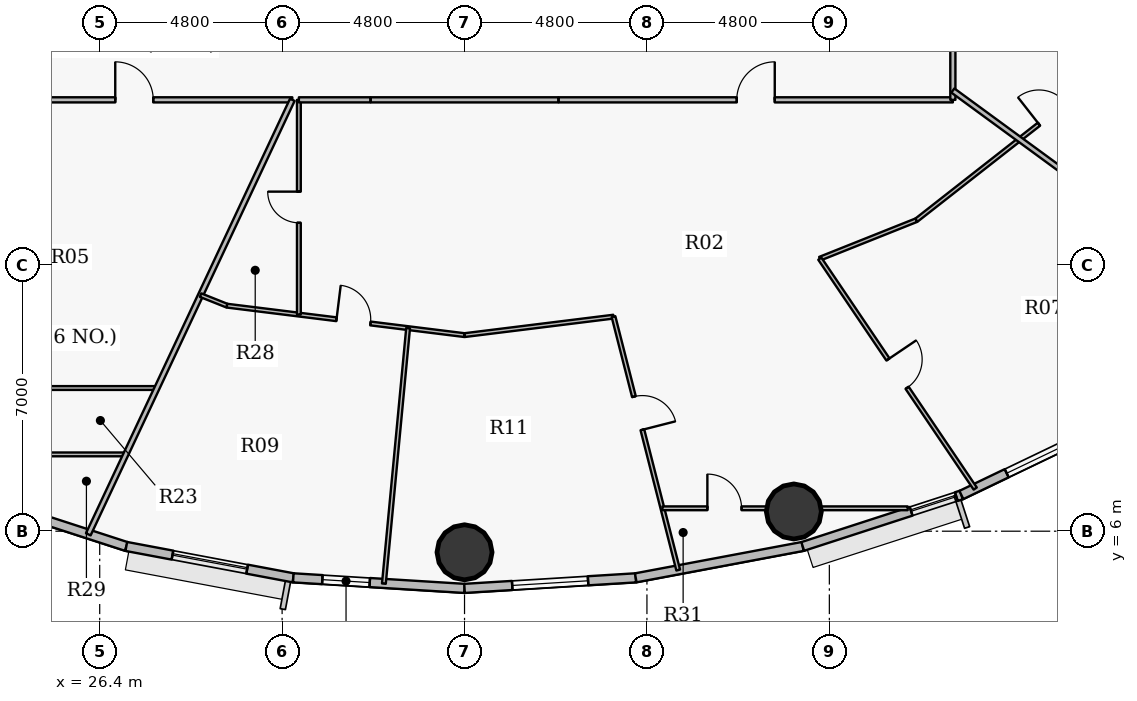
"""IFC4 building model, lengths in metres.
Left out: names, types, materials, properties, quantities, classifications, styles, units other than length and angle.
Written with IfcOpenShell. Run it as: python <this file> out.ifc"""

import sys

from ifc_helpers import new_model, si_unit, direction, frame, frame_2d, origin, origin_2d, place, context, subcontext, project, spatial, rectangle, hollow_circle, extrude, source, transform, mapped, element, fill, save


model = new_model("IFC4")
c1 = context("Model", 3, precision=1e-05, world=origin(), true_north=direction((0.0, 1.0)))
c2 = subcontext(c1, "Body", "Model", "MODEL_VIEW")
j1 = project(units=[si_unit("LENGTHUNIT", "METRE"), si_unit("PLANEANGLEUNIT", "RADIAN")], contexts=[c1])
p1 = place(None, origin())
s1 = spatial("IfcSite", under=j1, at=p1, CompositionType="ELEMENT")
p2 = place(p1, origin())
s2 = spatial("IfcBuilding", under=s1, at=p2, CompositionType="ELEMENT")
p3 = place(p2, frame((0.0, 0.0, 142.2)))
s3 = spatial("IfcBuildingStorey", under=s2, at=p3, CompositionType="ELEMENT", Elevation=142.2)
for number, where, z_axis, x_axis in (
    (1, (36.0, 5.445, 0.0), (0.0, 0.0, 1.0), (1.0, 0.0, 0.0)),
    (2, (44.666, 6.519, 0.0), (0.0, 0.0, 1.0), (1.0, 0.0, 0.0)),
):
    element("IfcColumn", number, at=place(p3, frame(where, z_axis=z_axis, x_axis=x_axis)), inside=s3, PredefinedType="COLUMN", context=c2, shape_type="SweptSolid", body=[
        extrude(hollow_circle(Radius=0.725, WallThickness=0.042, at=origin_2d()), origin(), (0.0, 0.0, 1.0), 3.75),
    ])
p4 = place(p3, frame((27.1, 5.599, 0.0), z_axis=(0.0, 0.0, 1.0), x_axis=(-0.951211346073, 0.308540070495, 0.0)))
e3 = element("IfcWall", 3, at=p4, inside=s3, PredefinedType="SOLIDWALL", context=c2, shape_type="SweptSolid", body=[
    extrude(rectangle(XDim=4.388, YDim=0.24, at=frame_2d((2.194, 0.0))), origin(), (0.0, 0.0, 1.0), 3.45),
])
p5 = place(p3, frame((31.494, 4.773, 0.0), z_axis=(0.0, 0.0, 1.0), x_axis=(-0.982789252177, 0.184730305596, 0.0)))
e4 = element("IfcWall", 4, at=p5, inside=s3, PredefinedType="SOLIDWALL", context=c2, shape_type="SweptSolid", body=[
    extrude(rectangle(XDim=4.471, YDim=0.24, at=frame_2d((2.235, 0.0))), origin(), (0.0, 0.0, 1.0), 3.45),
])
p6 = place(p5, frame((1.236, 0.0, 0.9)))
e5 = element("IfcOpeningElement", 5, at=p6, cuts=e4, PredefinedType="OPENING", context=c2, shape_type="SweptSolid", body=[
    extrude(rectangle(XDim=2.0, YDim=1.75, at=origin_2d()), frame((1.0, 0.13, 0.875), z_axis=(0.0, -1.0, 0.0), x_axis=(1.0, 0.0, 0.0)), (0.0, 0.0, 1.0), 0.26),
])
p7 = place(p3, frame((36.0, 4.495, 0.0), z_axis=(0.0, 0.0, 1.0), x_axis=(-0.998107531589, 0.061492726276, 0.0)))
e6 = element("IfcWall", 6, at=p7, inside=s3, PredefinedType="SOLIDWALL", context=c2, shape_type="SweptSolid", body=[
    extrude(rectangle(XDim=4.514, YDim=0.24, at=frame_2d((2.257, 0.0))), origin(), (0.0, 0.0, 1.0), 3.45),
])
p8 = place(p7, frame((2.499, 0.0, 0.9)))
e7 = element("IfcOpeningElement", 7, at=p8, cuts=e6, PredefinedType="OPENING", context=c2, shape_type="SweptSolid", body=[
    extrude(rectangle(XDim=1.25, YDim=1.65, at=origin_2d()), frame((0.625, 0.13, 0.825), z_axis=(0.0, -1.0, 0.0), x_axis=(1.0, 0.0, 0.0)), (0.0, 0.0, 1.0), 0.26),
])
p9 = place(p3, frame((40.506, 4.773, 0.0), z_axis=(0.0, 0.0, 1.0), x_axis=(-0.998107531589, -0.061492726276, 0.0)))
e8 = element("IfcWall", 8, at=p9, inside=s3, PredefinedType="SOLIDWALL", context=c2, shape_type="SweptSolid", body=[
    extrude(rectangle(XDim=4.514, YDim=0.24, at=frame_2d((2.257, 0.0))), origin(), (0.0, 0.0, 1.0), 3.45),
])
p10 = place(p9, frame((1.257, 0.0, 0.9)))
e9 = element("IfcOpeningElement", 9, at=p10, cuts=e8, PredefinedType="OPENING", context=c2, shape_type="SweptSolid", body=[
    extrude(rectangle(XDim=2.0, YDim=1.75, at=origin_2d()), frame((1.0, 0.13, 0.875), z_axis=(0.0, -1.0, 0.0), x_axis=(1.0, 0.0, 0.0)), (0.0, 0.0, 1.0), 0.26),
])
p11 = place(p3, frame((44.9, 5.599, 0.0), z_axis=(0.0, 0.0, 1.0), x_axis=(-0.982789252177, -0.184730305596, 0.0)))
e10 = element("IfcWall", 10, at=p11, inside=s3, PredefinedType="SOLIDWALL", context=c2, shape_type="SweptSolid", body=[
    extrude(rectangle(XDim=4.471, YDim=0.24, at=frame_2d((2.235, 0.0))), origin(), (0.0, 0.0, 1.0), 3.45),
])
p12 = place(p3, frame((49.074, 6.953, 0.0), z_axis=(0.0, 0.0, 1.0), x_axis=(-0.951211346073, -0.308540070495, 0.0)))
e11 = element("IfcWall", 11, at=p12, inside=s3, PredefinedType="SOLIDWALL", context=c2, shape_type="SweptSolid", body=[
    extrude(rectangle(XDim=4.388, YDim=0.24, at=frame_2d((2.194, 0.0))), origin(), (0.0, 0.0, 1.0), 3.45),
])
p13 = place(p12, frame((0.14, 0.0, 0.9)))
e12 = element("IfcOpeningElement", 12, at=p13, cuts=e11, PredefinedType="OPENING", context=c2, shape_type="SweptSolid", body=[
    extrude(rectangle(XDim=1.25, YDim=1.65, at=origin_2d()), frame((0.625, 0.13, 0.825), z_axis=(0.0, -1.0, 0.0), x_axis=(1.0, 0.0, 0.0)), (0.0, 0.0, 1.0), 0.26),
])
p14 = place(p3, frame((52.925, 8.801, 0.0), z_axis=(0.0, 0.0, 1.0), x_axis=(-0.901589935876, -0.432591709962, 0.0)))
e13 = element("IfcWall", 13, at=p14, inside=s3, PredefinedType="SOLIDWALL", context=c2, shape_type="SweptSolid", body=[
    extrude(rectangle(XDim=4.272, YDim=0.24, at=frame_2d((2.136, 0.0))), origin(), (0.0, 0.0, 1.0), 3.45),
])
p15 = place(p14, frame((0.949, 0.0, 0.9)))
e14 = element("IfcOpeningElement", 14, at=p15, cuts=e13, PredefinedType="OPENING", context=c2, shape_type="SweptSolid", body=[
    extrude(rectangle(XDim=2.0, YDim=1.75, at=origin_2d()), frame((1.0, 0.13, 0.875), z_axis=(0.0, -1.0, 0.0), x_axis=(1.0, 0.0, 0.0)), (0.0, 0.0, 1.0), 0.26),
])
p16 = place(p3, frame((17.62, 9.768, 0.0), z_axis=(0.0, 0.0, 1.0), x_axis=(1.0, 0.0, 0.0)))
e15 = element("IfcWall", 15, at=p16, inside=s3, PredefinedType="PARTITIONING", context=c2, shape_type="SweptSolid", body=[
    extrude(rectangle(XDim=10.288, YDim=0.1, at=frame_2d((5.144, 0.0))), origin(), (0.0, 0.0, 1.0), 2.885),
])
p17 = place(p16, frame((3.322, 0.0, 0.0)))
e16 = element("IfcOpeningElement", 16, at=p17, cuts=e15, PredefinedType="OPENING", context=c2, shape_type="SweptSolid", body=[
    extrude(rectangle(XDim=0.9, YDim=2.1, at=origin_2d()), frame((0.45, 0.06, 1.05), z_axis=(0.0, -1.0, 0.0), x_axis=(1.0, 0.0, 0.0)), (0.0, 0.0, 1.0), 0.12),
])
p18 = place(p3, frame((20.688, 8.021, 0.0), z_axis=(0.0, 0.0, 1.0), x_axis=(1.0, 0.0, 0.0)))
e17 = element("IfcWall", 17, at=p18, inside=s3, PredefinedType="PARTITIONING", context=c2, shape_type="SweptSolid", body=[
    extrude(rectangle(XDim=6.399, YDim=0.1, at=frame_2d((3.2, 0.0))), origin(), (0.0, 0.0, 1.0), 2.885),
])
p19 = place(p18, frame((3.591, 0.0, 0.0)))
e18 = element("IfcOpeningElement", 18, at=p19, cuts=e17, PredefinedType="OPENING", context=c2, shape_type="SweptSolid", body=[
    extrude(rectangle(XDim=0.82, YDim=2.1, at=origin_2d()), frame((0.41, 0.06, 1.05), z_axis=(0.0, -1.0, 0.0), x_axis=(1.0, 0.0, 0.0)), (0.0, 0.0, 1.0), 0.12),
])
p20 = place(p3, frame((23.15, 17.35, 0.0), z_axis=(0.0, 0.0, 1.0), x_axis=(1.0, 0.0, 0.0)))
e19 = element("IfcWall", 19, at=p20, inside=s3, PredefinedType="PARTITIONING", context=c2, shape_type="SweptSolid", body=[
    extrude(rectangle(XDim=8.318, YDim=0.135, at=frame_2d((4.159, 0.0))), origin(), (0.0, 0.0, 1.0), 2.885),
])
p21 = place(p20, frame((3.659, 0.0, 0.0)))
e20 = element("IfcOpeningElement", 20, at=p21, cuts=e19, PredefinedType="OPENING", context=c2, shape_type="SweptSolid", body=[
    extrude(rectangle(XDim=1.0, YDim=2.15, at=origin_2d()), frame((0.5, 0.078, 1.075), z_axis=(0.0, -1.0, 0.0), x_axis=(1.0, 0.0, 0.0)), (0.0, 0.0, 1.0), 0.155),
])
p22 = place(p3, frame((26.1, 5.918, 0.0), z_axis=(0.0, 0.0, 1.0), x_axis=(0.425072644526, 0.905159238408, 0.0)))
e21 = element("IfcWall", 21, at=p22, inside=s3, PredefinedType="PARTITIONING", context=c2, shape_type="SweptSolid", body=[
    extrude(rectangle(XDim=12.63, YDim=0.135, at=frame_2d((6.315, 0.0))), origin(), (0.0, 0.0, 1.0), 2.885),
])
p23 = place(p3, frame((29.055, 12.211, 0.0), z_axis=(0.0, 0.0, 1.0), x_axis=(0.928859514795, -0.370432182423, 0.0)))
e22 = element("IfcWall", 22, at=p23, inside=s3, PredefinedType="PARTITIONING", context=c2, shape_type="SweptSolid", body=[
    extrude(rectangle(XDim=0.747, YDim=0.1, at=frame_2d((0.374, 0.0))), origin(), (0.0, 0.0, 1.0), 3.45),
])
p24 = place(p3, frame((29.749, 11.934, 0.0), z_axis=(0.0, 0.0, 1.0), x_axis=(0.992395485088, -0.123090215599, 0.0)))
e23 = element("IfcWall", 23, at=p24, inside=s3, PredefinedType="PARTITIONING", context=c2, shape_type="SweptSolid", body=[
    extrude(rectangle(XDim=6.299, YDim=0.1, at=frame_2d((3.15, 0.0))), origin(), (0.0, 0.0, 1.0), 2.885),
])
p25 = place(p24, frame((2.905, 0.0, 0.0)))
e24 = element("IfcOpeningElement", 24, at=p25, cuts=e23, PredefinedType="OPENING", context=c2, shape_type="SweptSolid", body=[
    extrude(rectangle(XDim=0.9, YDim=2.1, at=origin_2d()), frame((0.45, 0.06, 1.05), z_axis=(0.0, -1.0, 0.0), x_axis=(1.0, 0.0, 0.0)), (0.0, 0.0, 1.0), 0.12),
])
p26 = place(p3, frame((31.641, 11.7, 0.0), z_axis=(0.0, 0.0, 1.0), x_axis=(0.0, 1.0, 0.0)))
e25 = element("IfcWall", 25, at=p26, inside=s3, PredefinedType="PARTITIONING", context=c2, shape_type="SweptSolid", body=[
    extrude(rectangle(XDim=5.65, YDim=0.1, at=frame_2d((2.825, 0.0))), origin(), (0.0, 0.0, 1.0), 3.45),
])
p27 = place(p26, frame((2.415, 0.0, 0.0)))
e26 = element("IfcOpeningElement", 26, at=p27, cuts=e25, PredefinedType="OPENING", context=c2, shape_type="SweptSolid", body=[
    extrude(rectangle(XDim=0.82, YDim=2.1, at=origin_2d()), frame((0.41, 0.06, 1.05), z_axis=(0.0, -1.0, 0.0), x_axis=(1.0, 0.0, 0.0)), (0.0, 0.0, 1.0), 0.12),
])
p28 = place(p3, frame((31.641, 17.35, 0.0), z_axis=(0.0, 0.0, 1.0), x_axis=(1.0, 0.0, 0.0)))
e27 = element("IfcWall", 27, at=p28, inside=s3, PredefinedType="PARTITIONING", context=c2, shape_type="SweptSolid", body=[
    extrude(rectangle(XDim=1.882, YDim=0.135, at=frame_2d((0.941, 0.0))), origin(), (0.0, 0.0, 1.0), 3.45),
])
p29 = place(p3, frame((33.878, 4.621, 0.0), z_axis=(0.0, 0.0, 1.0), x_axis=(0.094368865944, 0.995537300728, 0.0)))
e28 = element("IfcWall", 28, at=p29, inside=s3, PredefinedType="PARTITIONING", context=c2, shape_type="SweptSolid", body=[
    extrude(rectangle(XDim=6.752, YDim=0.1, at=frame_2d((3.376, 0.0))), origin(), (0.0, 0.0, 1.0), 2.885),
])
p30 = place(p3, frame((36.0, 11.159, 0.0), z_axis=(0.0, 0.0, 1.0), x_axis=(0.992393437711, 0.123106721131, 0.0)))
e29 = element("IfcWall", 29, at=p30, inside=s3, PredefinedType="PARTITIONING", context=c2, shape_type="SweptSolid", body=[
    extrude(rectangle(XDim=3.95, YDim=0.1, at=frame_2d((1.975, 0.0))), origin(), (0.0, 0.0, 1.0), 2.885),
])
p31 = place(p3, frame((38.477, 17.35, 0.0), z_axis=(0.0, 0.0, 1.0), x_axis=(1.0, 0.0, 0.0)))
e30 = element("IfcWall", 30, at=p31, inside=s3, PredefinedType="PARTITIONING", context=c2, shape_type="SweptSolid", body=[
    extrude(rectangle(XDim=10.373, YDim=0.135, at=frame_2d((5.187, 0.0))), origin(), (0.0, 0.0, 1.0), 2.885),
])
p32 = place(p31, frame((4.687, 0.0, 0.0)))
e31 = element("IfcOpeningElement", 31, at=p32, cuts=e30, PredefinedType="OPENING", context=c2, shape_type="SweptSolid", body=[
    extrude(rectangle(XDim=1.0, YDim=2.15, at=origin_2d()), frame((0.5, 0.078, 1.075), z_axis=(0.0, -1.0, 0.0), x_axis=(1.0, 0.0, 0.0)), (0.0, 0.0, 1.0), 0.155),
])
p33 = place(p3, frame((39.92, 11.645, 0.0), z_axis=(0.0, 0.0, 1.0), x_axis=(0.24735773306, -0.968924224021, 0.0)))
e32 = element("IfcWall", 32, at=p33, inside=s3, PredefinedType="PARTITIONING", context=c2, shape_type="SweptSolid", body=[
    extrude(rectangle(XDim=6.881, YDim=0.1, at=frame_2d((3.441, 0.0))), origin(), (0.0, 0.0, 1.0), 2.885),
])
p34 = place(p33, frame((2.172, 0.0, 0.0)))
e33 = element("IfcOpeningElement", 33, at=p34, cuts=e32, PredefinedType="OPENING", context=c2, shape_type="SweptSolid", body=[
    extrude(rectangle(XDim=0.9, YDim=2.1, at=origin_2d()), frame((0.45, 0.06, 1.05), z_axis=(0.0, -1.0, 0.0), x_axis=(1.0, 0.0, 0.0)), (0.0, 0.0, 1.0), 0.12),
])
p35 = place(p3, frame((41.208, 6.603, 0.0), z_axis=(0.0, 0.0, 1.0), x_axis=(1.0, 0.0, 0.0)))
e34 = element("IfcWall", 34, at=p35, inside=s3, PredefinedType="PARTITIONING", context=c2, shape_type="SweptSolid", body=[
    extrude(rectangle(XDim=6.453, YDim=0.1, at=frame_2d((3.227, 0.0))), origin(), (0.0, 0.0, 1.0), 2.885),
])
p36 = place(p35, frame((1.183, 0.0, 0.0)))
e35 = element("IfcOpeningElement", 35, at=p36, cuts=e34, PredefinedType="OPENING", context=c2, shape_type="SweptSolid", body=[
    extrude(rectangle(XDim=0.9, YDim=2.1, at=origin_2d()), frame((0.45, 0.06, 1.05), z_axis=(0.0, -1.0, 0.0), x_axis=(1.0, 0.0, 0.0)), (0.0, 0.0, 1.0), 0.12),
])
p37 = place(p3, frame((45.35, 13.17, 0.0), z_axis=(0.0, 0.0, 1.0), x_axis=(0.928802486491, 0.370575149044, 0.0)))
e36 = element("IfcWall", 36, at=p37, inside=s3, PredefinedType="PARTITIONING", context=c2, shape_type="SweptSolid", body=[
    extrude(rectangle(XDim=2.736, YDim=0.1, at=frame_2d((1.368, 0.0))), origin(), (0.0, 0.0, 1.0), 3.45),
])
p38 = place(p3, frame((45.35, 13.17, 0.0), z_axis=(0.0, 0.0, 1.0), x_axis=(0.560082631059, -0.828436748573, 0.0)))
e37 = element("IfcWall", 37, at=p38, inside=s3, PredefinedType="PARTITIONING", context=c2, shape_type="SweptSolid", body=[
    extrude(rectangle(XDim=7.301, YDim=0.1, at=frame_2d((3.65, 0.0))), origin(), (0.0, 0.0, 1.0), 2.885),
])
p39 = place(p38, frame((3.2, 0.0, 0.0)))
e38 = element("IfcOpeningElement", 38, at=p39, cuts=e37, PredefinedType="OPENING", context=c2, shape_type="SweptSolid", body=[
    extrude(rectangle(XDim=0.9, YDim=2.1, at=origin_2d()), frame((0.45, 0.06, 1.05), z_axis=(0.0, -1.0, 0.0), x_axis=(1.0, 0.0, 0.0)), (0.0, 0.0, 1.0), 0.12),
])
p40 = place(p3, frame((47.891, 14.184, 0.0), z_axis=(0.0, 0.0, 1.0), x_axis=(0.787333679705, 0.616527109544, 0.0)))
e39 = element("IfcWall", 39, at=p40, inside=s3, PredefinedType="PARTITIONING", context=c2, shape_type="SweptSolid", body=[
    extrude(rectangle(XDim=5.685, YDim=0.1, at=frame_2d((2.842, 0.0))), origin(), (0.0, 0.0, 1.0), 2.885),
])
p41 = place(p40, frame((4.096, 0.0, 0.0)))
e40 = element("IfcOpeningElement", 40, at=p41, cuts=e39, PredefinedType="OPENING", context=c2, shape_type="SweptSolid", body=[
    extrude(rectangle(XDim=0.9, YDim=2.1, at=origin_2d()), frame((0.45, 0.06, 1.05), z_axis=(0.0, -1.0, 0.0), x_axis=(1.0, 0.0, 0.0)), (0.0, 0.0, 1.0), 0.12),
])
p42 = place(p3, frame((48.85, 17.35, 0.0), z_axis=(0.0, 0.0, 1.0), x_axis=(0.0, 1.0, 0.0)))
e41 = element("IfcWall", 41, at=p42, inside=s3, PredefinedType="PARTITIONING", context=c2, shape_type="SweptSolid", body=[
    extrude(rectangle(XDim=19.3, YDim=0.135, at=frame_2d((9.65, 0.0))), origin(), (0.0, 0.0, 1.0), 2.885),
])
p43 = place(p42, frame((7.609, 0.0, 0.0)))
e42 = element("IfcOpeningElement", 42, at=p43, cuts=e41, PredefinedType="OPENING", context=c2, shape_type="SweptSolid", body=[
    extrude(rectangle(XDim=1.0, YDim=2.15, at=origin_2d()), frame((0.5, 0.078, 1.075), z_axis=(0.0, -1.0, 0.0), x_axis=(1.0, 0.0, 0.0)), (0.0, 0.0, 1.0), 0.155),
])
p44 = place(p3, frame((48.85, 17.595, 0.0), z_axis=(0.0, 0.0, 1.0), x_axis=(0.806958414, -0.590608261096, 0.0)))
e43 = element("IfcWall", 43, at=p44, inside=s3, PredefinedType="PARTITIONING", context=c2, shape_type="SweptSolid", body=[
    extrude(rectangle(XDim=10.063, YDim=0.135, at=frame_2d((5.032, 0.0))), origin(), (0.0, 0.0, 1.0), 2.885),
])
p45 = place(p3, frame((38.467, 17.35, 0.0), z_axis=(0.0, 0.0, 1.0), x_axis=(-1.0, 0.0, 0.0)))
e44 = element("IfcWall", 44, at=p45, inside=s3, PredefinedType="PARTITIONING", context=c2, shape_type="SweptSolid", body=[
    extrude(rectangle(XDim=4.934, YDim=0.135, at=frame_2d((2.467, 0.0))), origin(), (0.0, 0.0, 1.0), 2.885),
])
m1 = source(origin(), c2, "Body", "SweptSolid", [
    extrude(rectangle(XDim=2.0, YDim=1.75, at=origin_2d()), frame((1.0, 0.03, 0.875), z_axis=(0.0, -1.0, 0.0), x_axis=(1.0, 0.0, 0.0)), (0.0, 0.0, 1.0), 0.06),
])
p46 = place(p6, origin())
e45 = element("IfcWindow", 45, at=p46, inside=s3, PartitioningType="DOUBLE_PANEL_VERTICAL", PredefinedType="WINDOW", context=c2, shape_type="MappedRepresentation", body=[
    mapped(m1, transform((0.0, 0.0, 0.0), x_axis=(1.0, 0.0, 0.0), y_axis=(0.0, 1.0, 0.0), z_axis=(0.0, 0.0, 1.0), scale=1.0)),
])
fill(e5, e45)
m2 = source(origin(), c2, "Body", "SweptSolid", [
    extrude(rectangle(XDim=1.25, YDim=1.65, at=origin_2d()), frame((0.625, 0.03, 0.825), z_axis=(0.0, -1.0, 0.0), x_axis=(1.0, 0.0, 0.0)), (0.0, 0.0, 1.0), 0.06),
])
p47 = place(p8, origin())
e46 = element("IfcWindow", 46, at=p47, inside=s3, PartitioningType="SINGLE_PANEL", PredefinedType="WINDOW", context=c2, shape_type="MappedRepresentation", body=[
    mapped(m2, transform((0.0, 0.0, 0.0), x_axis=(1.0, 0.0, 0.0), y_axis=(0.0, 1.0, 0.0), z_axis=(0.0, 0.0, 1.0), scale=1.0)),
])
fill(e7, e46)
p48 = place(p10, origin())
e47 = element("IfcWindow", 47, at=p48, inside=s3, PartitioningType="DOUBLE_PANEL_VERTICAL", PredefinedType="WINDOW", context=c2, shape_type="MappedRepresentation", body=[
    mapped(m1, transform((0.0, 0.0, 0.0), x_axis=(1.0, 0.0, 0.0), y_axis=(0.0, 1.0, 0.0), z_axis=(0.0, 0.0, 1.0), scale=1.0)),
])
fill(e9, e47)
p49 = place(p15, origin())
e48 = element("IfcWindow", 48, at=p49, inside=s3, PartitioningType="DOUBLE_PANEL_VERTICAL", PredefinedType="WINDOW", context=c2, shape_type="MappedRepresentation", body=[
    mapped(m1, transform((0.0, 0.0, 0.0), x_axis=(1.0, 0.0, 0.0), y_axis=(0.0, 1.0, 0.0), z_axis=(0.0, 0.0, 1.0), scale=1.0)),
])
fill(e14, e48)
p50 = place(p13, origin())
e49 = element("IfcWindow", 49, at=p50, inside=s3, PartitioningType="SINGLE_PANEL", PredefinedType="WINDOW", context=c2, shape_type="MappedRepresentation", body=[
    mapped(m2, transform((0.0, 0.0, 0.0), x_axis=(1.0, 0.0, 0.0), y_axis=(0.0, 1.0, 0.0), z_axis=(0.0, 0.0, 1.0), scale=1.0)),
])
fill(e12, e49)
m3 = source(origin(), c2, "Body", "SweptSolid", [
    extrude(rectangle(XDim=1.0, YDim=2.15, at=origin_2d()), frame((0.5, 0.025, 1.075), z_axis=(0.0, -1.0, 0.0), x_axis=(1.0, 0.0, 0.0)), (0.0, 0.0, 1.0), 0.05),
])
p51 = place(p21, origin())
e50 = element("IfcDoor", 50, at=p51, inside=s3, OperationType="SINGLE_SWING_LEFT", PredefinedType="DOOR", context=c2, shape_type="MappedRepresentation", body=[
    mapped(m3, transform((0.0, 0.0, 0.0), x_axis=(1.0, 0.0, 0.0), y_axis=(0.0, 1.0, 0.0), z_axis=(0.0, 0.0, 1.0), scale=1.0)),
])
fill(e20, e50)
p52 = place(p32, origin())
e51 = element("IfcDoor", 51, at=p52, inside=s3, OperationType="SINGLE_SWING_RIGHT", PredefinedType="DOOR", context=c2, shape_type="MappedRepresentation", body=[
    mapped(m3, transform((0.0, 0.0, 0.0), x_axis=(1.0, 0.0, 0.0), y_axis=(0.0, 1.0, 0.0), z_axis=(0.0, 0.0, 1.0), scale=1.0)),
])
fill(e31, e51)
m4 = source(origin(), c2, "Body", "SweptSolid", [
    extrude(rectangle(XDim=0.9, YDim=2.1, at=origin_2d()), frame((0.45, 0.025, 1.05), z_axis=(0.0, -1.0, 0.0), x_axis=(1.0, 0.0, 0.0)), (0.0, 0.0, 1.0), 0.05),
])
p53 = place(p25, origin())
e52 = element("IfcDoor", 52, at=p53, inside=s3, OperationType="SINGLE_SWING_LEFT", PredefinedType="DOOR", context=c2, shape_type="MappedRepresentation", body=[
    mapped(m4, transform((0.0, 0.0, 0.0), x_axis=(1.0, 0.0, 0.0), y_axis=(0.0, 1.0, 0.0), z_axis=(0.0, 0.0, 1.0), scale=1.0)),
])
fill(e24, e52)
p54 = place(p34, origin())
e53 = element("IfcDoor", 53, at=p54, inside=s3, OperationType="SINGLE_SWING_RIGHT", PredefinedType="DOOR", context=c2, shape_type="MappedRepresentation", body=[
    mapped(m4, transform((0.0, 0.0, 0.0), x_axis=(1.0, 0.0, 0.0), y_axis=(0.0, 1.0, 0.0), z_axis=(0.0, 0.0, 1.0), scale=1.0)),
])
fill(e33, e53)
p55 = place(p39, origin())
e54 = element("IfcDoor", 54, at=p55, inside=s3, OperationType="SINGLE_SWING_LEFT", PredefinedType="DOOR", context=c2, shape_type="MappedRepresentation", body=[
    mapped(m4, transform((0.0, 0.0, 0.0), x_axis=(1.0, 0.0, 0.0), y_axis=(0.0, 1.0, 0.0), z_axis=(0.0, 0.0, 1.0), scale=1.0)),
])
fill(e38, e54)
m5 = source(origin(), c2, "Body", "SweptSolid", [
    extrude(rectangle(XDim=0.82, YDim=2.1, at=origin_2d()), frame((0.41, 0.025, 1.05), z_axis=(0.0, -1.0, 0.0), x_axis=(1.0, 0.0, 0.0)), (0.0, 0.0, 1.0), 0.05),
])
p56 = place(p27, origin())
e55 = element("IfcDoor", 55, at=p56, inside=s3, OperationType="SINGLE_SWING_RIGHT", PredefinedType="DOOR", context=c2, shape_type="MappedRepresentation", body=[
    mapped(m5, transform((0.0, 0.0, 0.0), x_axis=(1.0, 0.0, 0.0), y_axis=(0.0, 1.0, 0.0), z_axis=(0.0, 0.0, 1.0), scale=1.0)),
])
fill(e26, e55)
p57 = place(p36, origin())
e56 = element("IfcDoor", 56, at=p57, inside=s3, OperationType="SINGLE_SWING_LEFT", PredefinedType="DOOR", context=c2, shape_type="MappedRepresentation", body=[
    mapped(m4, transform((0.0, 0.0, 0.0), x_axis=(1.0, 0.0, 0.0), y_axis=(0.0, 1.0, 0.0), z_axis=(0.0, 0.0, 1.0), scale=1.0)),
])
fill(e35, e56)
p58 = place(p41, origin())
e57 = element("IfcDoor", 57, at=p58, inside=s3, OperationType="SINGLE_SWING_LEFT", PredefinedType="DOOR", context=c2, shape_type="MappedRepresentation", body=[
    mapped(m4, transform((0.0, 0.0, 0.0), x_axis=(1.0, 0.0, 0.0), y_axis=(0.0, 1.0, 0.0), z_axis=(0.0, 0.0, 1.0), scale=1.0)),
])
fill(e40, e57)
save(model, sys.argv[1])
